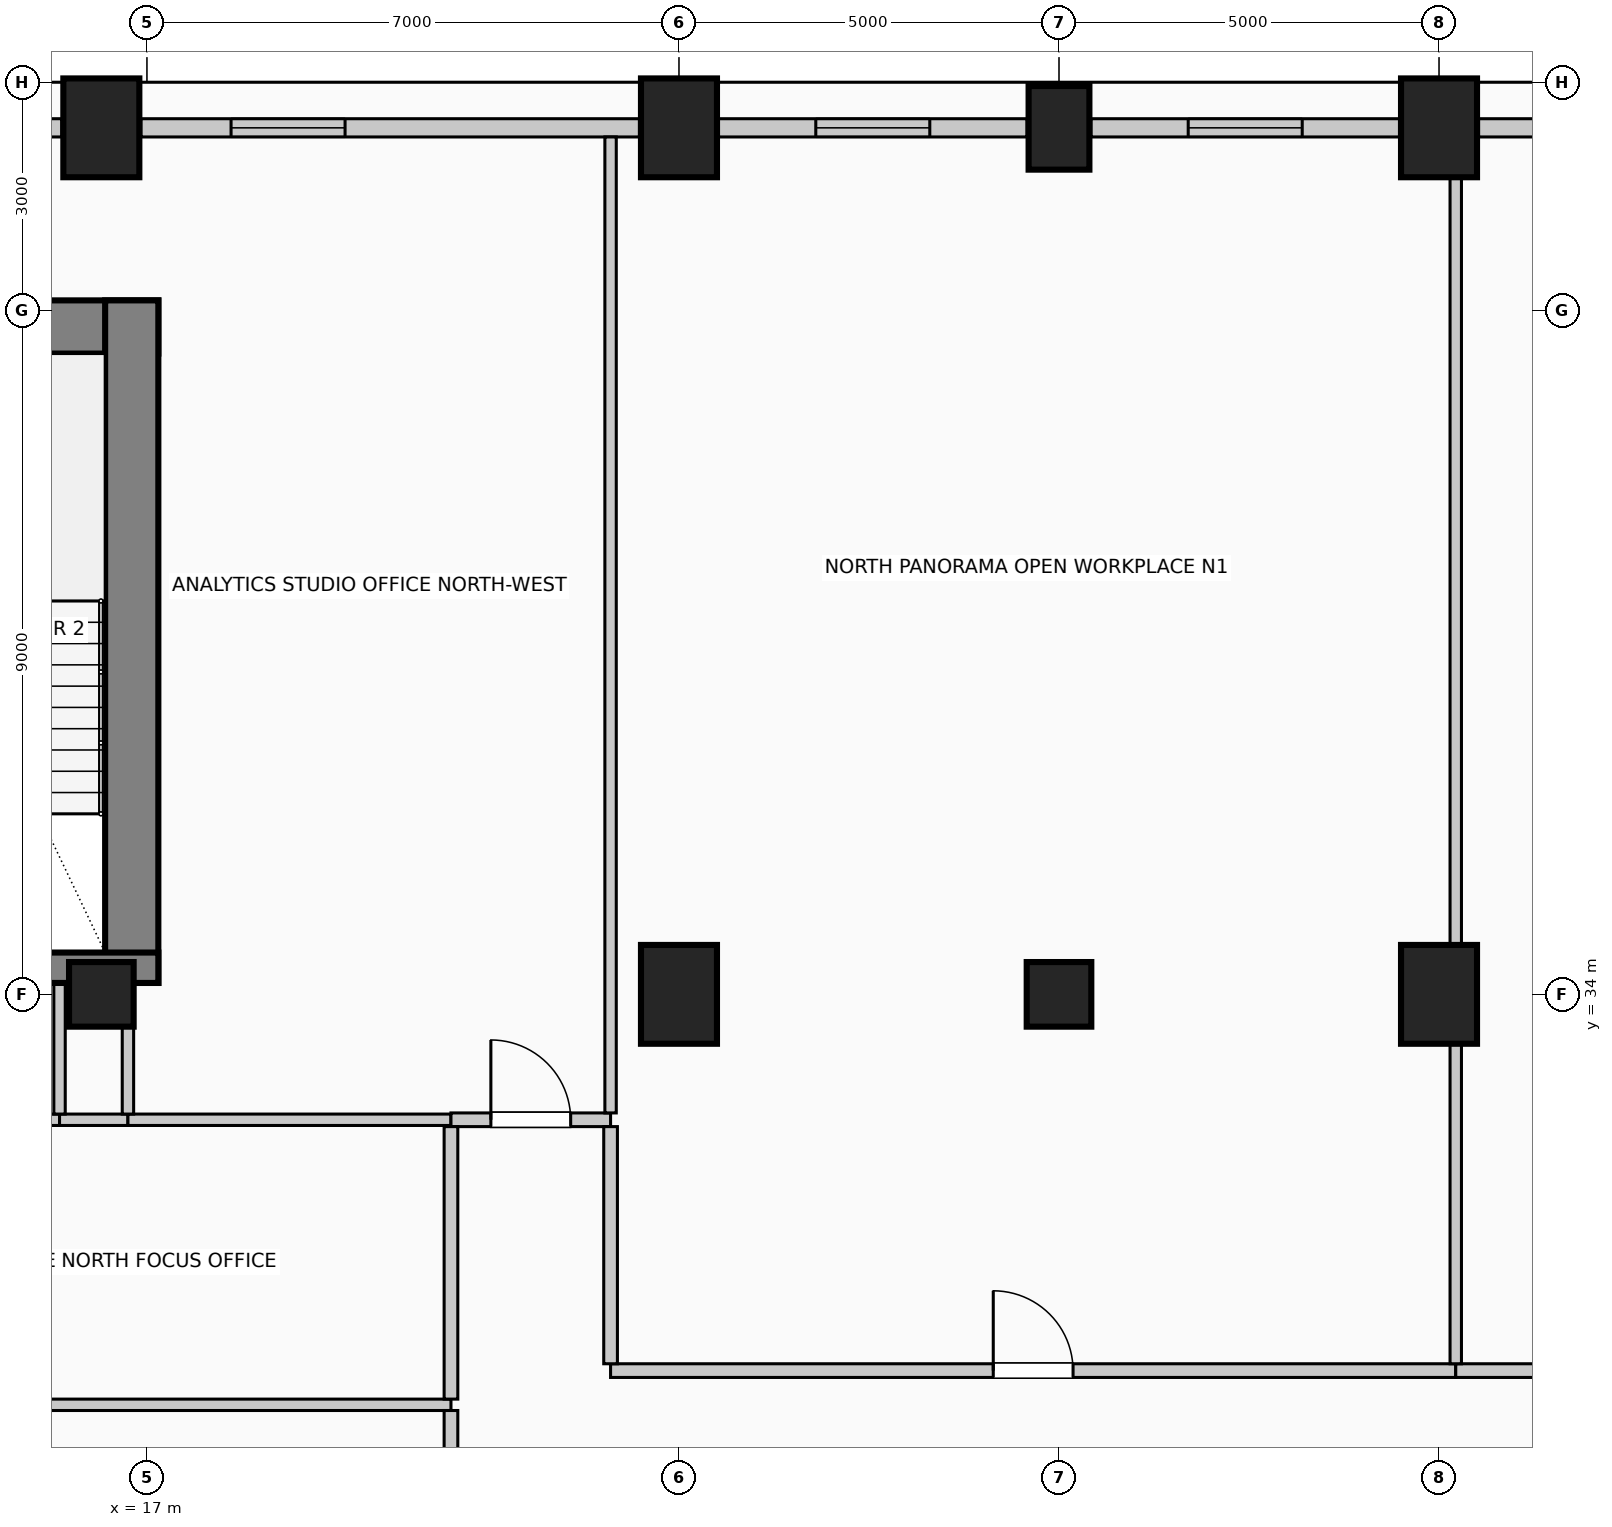
"""IFC4 building model, lengths in metres.
Left out: names, types, materials, properties, quantities, classifications, styles, units other than length and angle.
Written with IfcOpenShell. Run it as: python <this file> out.ifc"""

import sys

from ifc_helpers import new_model, si_unit, direction, frame, frame_2d, origin, origin_2d, place, context, subcontext, project, spatial, rectangle, circle, extrude, element, fill, save


model = new_model("IFC4")
c1 = context("Model", 3, precision=1e-05, world=origin(), true_north=direction((0.0, 1.0)))
c2 = subcontext(c1, "Body", "Model", "MODEL_VIEW")
j1 = project(units=[si_unit("LENGTHUNIT", "METRE"), si_unit("PLANEANGLEUNIT", "RADIAN")], contexts=[c1])
p1 = place(None, origin())
s1 = spatial("IfcSite", under=j1, at=p1, CompositionType="ELEMENT")
p2 = place(p1, origin())
s2 = spatial("IfcBuilding", under=s1, at=p2, CompositionType="ELEMENT")
p3 = place(p2, frame((0.0, 0.0, 202.6)))
s3 = spatial("IfcBuildingStorey", under=s2, at=p3, CompositionType="ELEMENT", Elevation=202.6)
p4 = place(p3, frame((2.85, 42.78, 0.0), z_axis=(0.0, 0.0, 1.0), x_axis=(1.0, 0.0, 0.0)))
e1 = element("IfcWall", 1, at=p4, inside=s3, PredefinedType="SHEAR", context=c2, shape_type="SweptSolid", body=[
    extrude(rectangle(XDim=14.3, YDim=0.7, at=frame_2d((7.15, 0.0))), origin(), (0.0, 0.0, 1.0), 4.0),
])
p5 = place(p3, frame((16.8, 34.15, 0.0), z_axis=(0.0, 0.0, 1.0), x_axis=(0.0, 1.0, 0.0)))
e2 = element("IfcWall", 2, at=p5, inside=s3, PredefinedType="SHEAR", context=c2, shape_type="SweptSolid", body=[
    extrude(rectangle(XDim=8.98, YDim=0.7, at=frame_2d((4.49, 0.0))), origin(), (0.0, 0.0, 1.0), 4.0),
])
p6 = place(p3, frame((12.29, 34.35, 0.0), z_axis=(0.0, 0.0, 1.0), x_axis=(1.0, 0.0, 0.0)))
e3 = element("IfcWall", 3, at=p6, inside=s3, PredefinedType="SHEAR", context=c2, shape_type="SweptSolid", body=[
    extrude(rectangle(XDim=4.86, YDim=0.4, at=frame_2d((2.43, 0.0))), origin(), (0.0, 0.0, 1.0), 4.0),
])
p7 = place(p6, frame((1.4, 0.0, 0.0)))
e4 = element("IfcOpeningElement", 4, at=p7, cuts=e3, PredefinedType="OPENING", context=c2, shape_type="SweptSolid", body=[
    extrude(rectangle(XDim=1.15, YDim=2.2, at=frame_2d((0.575, 1.1))), frame((0.0, 0.21, 0.0), z_axis=(0.0, -1.0, 0.0), x_axis=(1.0, 0.0, 0.0)), (0.0, 0.0, 1.0), 0.42),
])
for number, where, z_axis, x_axis in (
    (5, (16.4, 45.4, 0.0), (0.0, 0.0, 1.0), (1.0, 0.0, 0.0)),
    (6, (24.0, 45.4, 0.0), (0.0, 0.0, 1.0), (1.0, 0.0, 0.0)),
):
    element("IfcColumn", number, at=place(p3, frame(where, z_axis=z_axis, x_axis=x_axis)), inside=s3, PredefinedType="COLUMN", context=c2, shape_type="SweptSolid", body=[
        extrude(rectangle(XDim=1.0, YDim=1.3, at=origin_2d()), origin(), (0.0, 0.0, 1.0), 4.0),
    ])
p8 = place(p3, frame((29.0, 45.4, 0.0), z_axis=(0.0, 0.0, 1.0), x_axis=(1.0, 0.0, 0.0)))
e7 = element("IfcColumn", 7, at=p8, inside=s3, PredefinedType="COLUMN", context=c2, shape_type="SweptSolid", body=[
    extrude(rectangle(XDim=0.8, YDim=1.1, at=origin_2d()), origin(), (0.0, 0.0, 1.0), 4.0),
])
for number, where, z_axis, x_axis in (
    (8, (34.0, 45.4, 0.0), (0.0, 0.0, 1.0), (1.0, 0.0, 0.0)),
    (9, (24.0, 34.0, 0.0), (0.0, 0.0, 1.0), (1.0, 0.0, 0.0)),
    (10, (34.0, 34.0, 0.0), (0.0, 0.0, 1.0), (1.0, 0.0, 0.0)),
):
    element("IfcColumn", number, at=place(p3, frame(where, z_axis=z_axis, x_axis=x_axis)), inside=s3, PredefinedType="COLUMN", context=c2, shape_type="SweptSolid", body=[
        extrude(rectangle(XDim=1.0, YDim=1.3, at=origin_2d()), origin(), (0.0, 0.0, 1.0), 4.0),
    ])
for number, where, z_axis, x_axis in (
    (11, (16.4, 34.0, 0.0), (0.0, 0.0, 1.0), (1.0, 0.0, 0.0)),
    (12, (29.0, 34.0, 0.0), (0.0, 0.0, 1.0), (1.0, 0.0, 0.0)),
):
    element("IfcColumn", number, at=place(p3, frame(where, z_axis=z_axis, x_axis=x_axis)), inside=s3, PredefinedType="COLUMN", context=c2, shape_type="SweptSolid", body=[
        extrude(circle(Radius=0.425, at=origin_2d()), origin(), (0.0, 0.0, 1.0), 4.0),
    ])
p9 = place(p3, frame((14.42, 45.4, 0.0), z_axis=(0.0, 0.0, 1.0), x_axis=(1.0, 0.0, 0.0)))
e13 = element("IfcWall", 13, at=p9, inside=s3, PredefinedType="SOLIDWALL", context=c2, shape_type="SweptSolid", body=[
    extrude(rectangle(XDim=1.46, YDim=0.24, at=frame_2d((0.73, 0.0))), origin(), (0.0, 0.0, 1.0), 3.0),
])
p10 = place(p3, frame((16.92, 45.4, 0.0), z_axis=(0.0, 0.0, 1.0), x_axis=(1.0, 0.0, 0.0)))
e14 = element("IfcWall", 14, at=p10, inside=s3, PredefinedType="SOLIDWALL", context=c2, shape_type="SweptSolid", body=[
    extrude(rectangle(XDim=6.56, YDim=0.24, at=frame_2d((3.28, 0.0))), origin(), (0.0, 0.0, 1.0), 3.0),
])
p11 = place(p10, frame((1.187, 0.0, 0.42)))
e15 = element("IfcOpeningElement", 15, at=p11, cuts=e14, PredefinedType="OPENING", context=c2, shape_type="SweptSolid", body=[
    extrude(rectangle(XDim=1.5, YDim=2.2, at=frame_2d((0.75, 1.1))), frame((0.0, 0.13, 0.0), z_axis=(0.0, -1.0, 0.0), x_axis=(1.0, 0.0, 0.0)), (0.0, 0.0, 1.0), 0.26),
])
p12 = place(p3, frame((24.52, 45.4, 0.0), z_axis=(0.0, 0.0, 1.0), x_axis=(1.0, 0.0, 0.0)))
e16 = element("IfcWall", 16, at=p12, inside=s3, PredefinedType="SOLIDWALL", context=c2, shape_type="SweptSolid", body=[
    extrude(rectangle(XDim=4.06, YDim=0.24, at=frame_2d((2.03, 0.0))), origin(), (0.0, 0.0, 1.0), 3.0),
])
p13 = place(p12, frame((1.28, 0.0, 0.42)))
e17 = element("IfcOpeningElement", 17, at=p13, cuts=e16, PredefinedType="OPENING", context=c2, shape_type="SweptSolid", body=[
    extrude(rectangle(XDim=1.5, YDim=2.2, at=frame_2d((0.75, 1.1))), frame((0.0, 0.13, 0.0), z_axis=(0.0, -1.0, 0.0), x_axis=(1.0, 0.0, 0.0)), (0.0, 0.0, 1.0), 0.26),
])
p14 = place(p3, frame((29.42, 45.4, 0.0), z_axis=(0.0, 0.0, 1.0), x_axis=(1.0, 0.0, 0.0)))
e18 = element("IfcWall", 18, at=p14, inside=s3, PredefinedType="SOLIDWALL", context=c2, shape_type="SweptSolid", body=[
    extrude(rectangle(XDim=4.06, YDim=0.24, at=frame_2d((2.03, 0.0))), origin(), (0.0, 0.0, 1.0), 3.0),
])
p15 = place(p14, frame((1.28, 0.0, 0.42)))
e19 = element("IfcOpeningElement", 19, at=p15, cuts=e18, PredefinedType="OPENING", context=c2, shape_type="SweptSolid", body=[
    extrude(rectangle(XDim=1.5, YDim=2.2, at=frame_2d((0.75, 1.1))), frame((0.0, 0.13, 0.0), z_axis=(0.0, -1.0, 0.0), x_axis=(1.0, 0.0, 0.0)), (0.0, 0.0, 1.0), 0.26),
])
p16 = place(p3, frame((34.52, 45.4, 0.0), z_axis=(0.0, 0.0, 1.0), x_axis=(1.0, 0.0, 0.0)))
e20 = element("IfcWall", 20, at=p16, inside=s3, PredefinedType="SOLIDWALL", context=c2, shape_type="SweptSolid", body=[
    extrude(rectangle(XDim=6.56, YDim=0.24, at=frame_2d((3.28, 0.0))), origin(), (0.0, 0.0, 1.0), 3.0),
])
p17 = place(p16, frame((3.873, 0.0, 0.42)))
e21 = element("IfcOpeningElement", 21, at=p17, cuts=e20, PredefinedType="OPENING", context=c2, shape_type="SweptSolid", body=[
    extrude(rectangle(XDim=1.5, YDim=2.2, at=frame_2d((0.75, 1.1))), frame((0.0, 0.13, 0.0), z_axis=(0.0, -1.0, 0.0), x_axis=(1.0, 0.0, 0.0)), (0.0, 0.0, 1.0), 0.26),
])
p18 = place(p3, frame((12.2, 28.6, 0.0), z_axis=(0.0, 0.0, 1.0), x_axis=(1.0, 0.0, 0.0)))
e22 = element("IfcWall", 22, at=p18, inside=s3, PredefinedType="PARTITIONING", context=c2, shape_type="SweptSolid", body=[
    extrude(rectangle(XDim=8.8, YDim=0.15, at=frame_2d((4.4, 0.0))), origin(), (0.0, 0.0, 1.0), 3.75),
])
p19 = place(p3, frame((23.1, 29.05, 0.0), z_axis=(0.0, 0.0, 1.0), x_axis=(1.0, 0.0, 0.0)))
e23 = element("IfcWall", 23, at=p19, inside=s3, PredefinedType="PARTITIONING", context=c2, shape_type="SweptSolid", body=[
    extrude(rectangle(XDim=11.12, YDim=0.18, at=frame_2d((5.56, 0.0))), origin(), (0.0, 0.0, 1.0), 3.75),
])
p20 = place(p19, frame((5.035, 0.0, 0.0)))
e24 = element("IfcOpeningElement", 24, at=p20, cuts=e23, PredefinedType="OPENING", context=c2, shape_type="SweptSolid", body=[
    extrude(rectangle(XDim=1.05, YDim=2.15, at=frame_2d((0.525, 1.075))), frame((0.0, 0.1, 0.0), z_axis=(0.0, -1.0, 0.0), x_axis=(1.0, 0.0, 0.0)), (0.0, 0.0, 1.0), 0.2),
])
p21 = place(p3, frame((34.22, 29.05, 0.0), z_axis=(0.0, 0.0, 1.0), x_axis=(1.0, 0.0, 0.0)))
e25 = element("IfcWall", 25, at=p21, inside=s3, PredefinedType="PARTITIONING", context=c2, shape_type="SweptSolid", body=[
    extrude(rectangle(XDim=7.33, YDim=0.18, at=frame_2d((3.665, 0.0))), origin(), (0.0, 0.0, 1.0), 3.75),
])
p22 = place(p21, frame((3.19, 0.0, 0.0)))
e26 = element("IfcOpeningElement", 26, at=p22, cuts=e25, PredefinedType="OPENING", context=c2, shape_type="SweptSolid", body=[
    extrude(rectangle(XDim=0.95, YDim=2.15, at=frame_2d((0.475, 1.075))), frame((0.0, 0.1, 0.0), z_axis=(0.0, -1.0, 0.0), x_axis=(1.0, 0.0, 0.0)), (0.0, 0.0, 1.0), 0.2),
])
p23 = place(p3, frame((12.33, 32.35, 0.0), z_axis=(0.0, 0.0, 1.0), x_axis=(1.0, 0.0, 0.0)))
e27 = element("IfcWall", 27, at=p23, inside=s3, PredefinedType="PARTITIONING", context=c2, shape_type="SweptSolid", body=[
    extrude(rectangle(XDim=3.52, YDim=0.15, at=frame_2d((1.76, 0.0))), origin(), (0.0, 0.0, 1.0), 3.75),
])
p24 = place(p23, frame((1.285, 0.0, 0.0)))
e28 = element("IfcOpeningElement", 28, at=p24, cuts=e27, PredefinedType="OPENING", context=c2, shape_type="SweptSolid", body=[
    extrude(rectangle(XDim=0.95, YDim=2.15, at=frame_2d((0.475, 1.075))), frame((0.0, 0.085, 0.0), z_axis=(0.0, -1.0, 0.0), x_axis=(1.0, 0.0, 0.0)), (0.0, 0.0, 1.0), 0.17),
])
p25 = place(p3, frame((15.85, 32.35, 0.0), z_axis=(0.0, 0.0, 1.0), x_axis=(1.0, 0.0, 0.0)))
e29 = element("IfcWall", 29, at=p25, inside=s3, PredefinedType="PARTITIONING", context=c2, shape_type="SweptSolid", body=[
    extrude(rectangle(XDim=0.9, YDim=0.15, at=frame_2d((0.45, 0.0))), origin(), (0.0, 0.0, 1.0), 3.75),
])
p26 = place(p3, frame((16.75, 32.35, 0.0), z_axis=(0.0, 0.0, 1.0), x_axis=(1.0, 0.0, 0.0)))
e30 = element("IfcWall", 30, at=p26, inside=s3, PredefinedType="PARTITIONING", context=c2, shape_type="SweptSolid", body=[
    extrude(rectangle(XDim=4.25, YDim=0.15, at=frame_2d((2.125, 0.0))), origin(), (0.0, 0.0, 1.0), 3.75),
])
p27 = place(p3, frame((21.0, 32.35, 0.0), z_axis=(0.0, 0.0, 1.0), x_axis=(1.0, 0.0, 0.0)))
e31 = element("IfcWall", 31, at=p27, inside=s3, PredefinedType="PARTITIONING", context=c2, shape_type="SweptSolid", body=[
    extrude(rectangle(XDim=2.1, YDim=0.18, at=frame_2d((1.05, 0.0))), origin(), (0.0, 0.0, 1.0), 3.75),
])
p28 = place(p27, frame((0.525, 0.0, 0.0)))
e32 = element("IfcOpeningElement", 32, at=p28, cuts=e31, PredefinedType="OPENING", context=c2, shape_type="SweptSolid", body=[
    extrude(rectangle(XDim=1.05, YDim=2.15, at=frame_2d((0.525, 1.075))), frame((0.0, 0.1, 0.0), z_axis=(0.0, -1.0, 0.0), x_axis=(1.0, 0.0, 0.0)), (0.0, 0.0, 1.0), 0.2),
])
p29 = place(p3, frame((15.85, 32.425, 0.0), z_axis=(0.0, 0.0, 1.0), x_axis=(0.0, 1.0, 0.0)))
e33 = element("IfcWall", 33, at=p29, inside=s3, PredefinedType="PARTITIONING", context=c2, shape_type="SweptSolid", body=[
    extrude(rectangle(XDim=1.725, YDim=0.15, at=frame_2d((0.862, 0.0))), origin(), (0.0, 0.0, 1.0), 3.75),
])
p30 = place(p3, frame((16.75, 32.425, 0.0), z_axis=(0.0, 0.0, 1.0), x_axis=(0.0, 1.0, 0.0)))
e34 = element("IfcWall", 34, at=p30, inside=s3, PredefinedType="PARTITIONING", context=c2, shape_type="SweptSolid", body=[
    extrude(rectangle(XDim=1.15, YDim=0.15, at=frame_2d((0.575, 0.0))), origin(), (0.0, 0.0, 1.0), 3.75),
])
p31 = place(p3, frame((21.0, 24.875, 0.0), z_axis=(0.0, 0.0, 1.0), x_axis=(0.0, 1.0, 0.0)))
e35 = element("IfcWall", 35, at=p31, inside=s3, PredefinedType="PARTITIONING", context=c2, shape_type="SweptSolid", body=[
    extrude(rectangle(XDim=3.65, YDim=0.18, at=frame_2d((1.825, 0.0))), origin(), (0.0, 0.0, 1.0), 3.75),
])
p32 = place(p3, frame((21.0, 28.675, 0.0), z_axis=(0.0, 0.0, 1.0), x_axis=(0.0, 1.0, 0.0)))
e36 = element("IfcWall", 36, at=p32, inside=s3, PredefinedType="PARTITIONING", context=c2, shape_type="SweptSolid", body=[
    extrude(rectangle(XDim=3.585, YDim=0.18, at=frame_2d((1.792, 0.0))), origin(), (0.0, 0.0, 1.0), 3.75),
])
p33 = place(p3, frame((23.1, 29.14, 0.0), z_axis=(0.0, 0.0, 1.0), x_axis=(0.0, 1.0, 0.0)))
e37 = element("IfcWall", 37, at=p33, inside=s3, PredefinedType="PARTITIONING", context=c2, shape_type="SweptSolid", body=[
    extrude(rectangle(XDim=3.12, YDim=0.18, at=frame_2d((1.56, 0.0))), origin(), (0.0, 0.0, 1.0), 3.75),
])
p34 = place(p3, frame((23.1, 32.44, 0.0), z_axis=(0.0, 0.0, 1.0), x_axis=(0.0, 1.0, 0.0)))
e38 = element("IfcWall", 38, at=p34, inside=s3, PredefinedType="PARTITIONING", context=c2, shape_type="SweptSolid", body=[
    extrude(rectangle(XDim=12.84, YDim=0.15, at=frame_2d((6.42, 0.0))), origin(), (0.0, 0.0, 1.0), 3.75),
])
p35 = place(p3, frame((34.22, 29.14, 0.0), z_axis=(0.0, 0.0, 1.0), x_axis=(0.0, 1.0, 0.0)))
e39 = element("IfcWall", 39, at=p35, inside=s3, PredefinedType="PARTITIONING", context=c2, shape_type="SweptSolid", body=[
    extrude(rectangle(XDim=4.21, YDim=0.15, at=frame_2d((2.105, 0.0))), origin(), (0.0, 0.0, 1.0), 3.145),
])
p36 = place(p3, frame((34.22, 34.65, 0.0), z_axis=(0.0, 0.0, 1.0), x_axis=(0.0, 1.0, 0.0)))
e40 = element("IfcWall", 40, at=p36, inside=s3, PredefinedType="PARTITIONING", context=c2, shape_type="SweptSolid", body=[
    extrude(rectangle(XDim=10.1, YDim=0.15, at=frame_2d((5.05, 0.0))), origin(), (0.0, 0.0, 1.0), 3.145),
])
p37 = place(p11, origin())
e41 = element("IfcWindow", 41, at=p37, inside=s3, PartitioningType="SINGLE_PANEL", PredefinedType="WINDOW", context=c2, shape_type="SweptSolid", body=[
    extrude(rectangle(XDim=1.5, YDim=2.2, at=frame_2d((0.75, 1.1))), frame((0.0, 0.03, 0.0), z_axis=(0.0, -1.0, 0.0), x_axis=(1.0, 0.0, 0.0)), (0.0, 0.0, 1.0), 0.06),
])
fill(e15, e41)
p38 = place(p13, origin())
e42 = element("IfcWindow", 42, at=p38, inside=s3, PartitioningType="SINGLE_PANEL", PredefinedType="WINDOW", context=c2, shape_type="SweptSolid", body=[
    extrude(rectangle(XDim=1.5, YDim=2.2, at=frame_2d((0.75, 1.1))), frame((0.0, 0.03, 0.0), z_axis=(0.0, -1.0, 0.0), x_axis=(1.0, 0.0, 0.0)), (0.0, 0.0, 1.0), 0.06),
])
fill(e17, e42)
p39 = place(p15, origin())
e43 = element("IfcWindow", 43, at=p39, inside=s3, PartitioningType="SINGLE_PANEL", PredefinedType="WINDOW", context=c2, shape_type="SweptSolid", body=[
    extrude(rectangle(XDim=1.5, YDim=2.2, at=frame_2d((0.75, 1.1))), frame((0.0, 0.03, 0.0), z_axis=(0.0, -1.0, 0.0), x_axis=(1.0, 0.0, 0.0)), (0.0, 0.0, 1.0), 0.06),
])
fill(e19, e43)
p40 = place(p20, origin())
e44 = element("IfcDoor", 44, at=p40, inside=s3, OperationType="SINGLE_SWING_LEFT", PredefinedType="DOOR", context=c2, shape_type="SweptSolid", body=[
    extrude(rectangle(XDim=1.05, YDim=2.15, at=frame_2d((0.525, 1.075))), frame((0.0, 0.025, 0.0), z_axis=(0.0, -1.0, 0.0), x_axis=(1.0, 0.0, 0.0)), (0.0, 0.0, 1.0), 0.05),
])
fill(e24, e44)
p41 = place(p28, origin())
e45 = element("IfcDoor", 45, at=p41, inside=s3, OperationType="SINGLE_SWING_LEFT", PredefinedType="DOOR", context=c2, shape_type="SweptSolid", body=[
    extrude(rectangle(XDim=1.05, YDim=2.15, at=frame_2d((0.525, 1.075))), frame((0.0, 0.025, 0.0), z_axis=(0.0, -1.0, 0.0), x_axis=(1.0, 0.0, 0.0)), (0.0, 0.0, 1.0), 0.05),
])
fill(e32, e45)
save(model, sys.argv[1])
